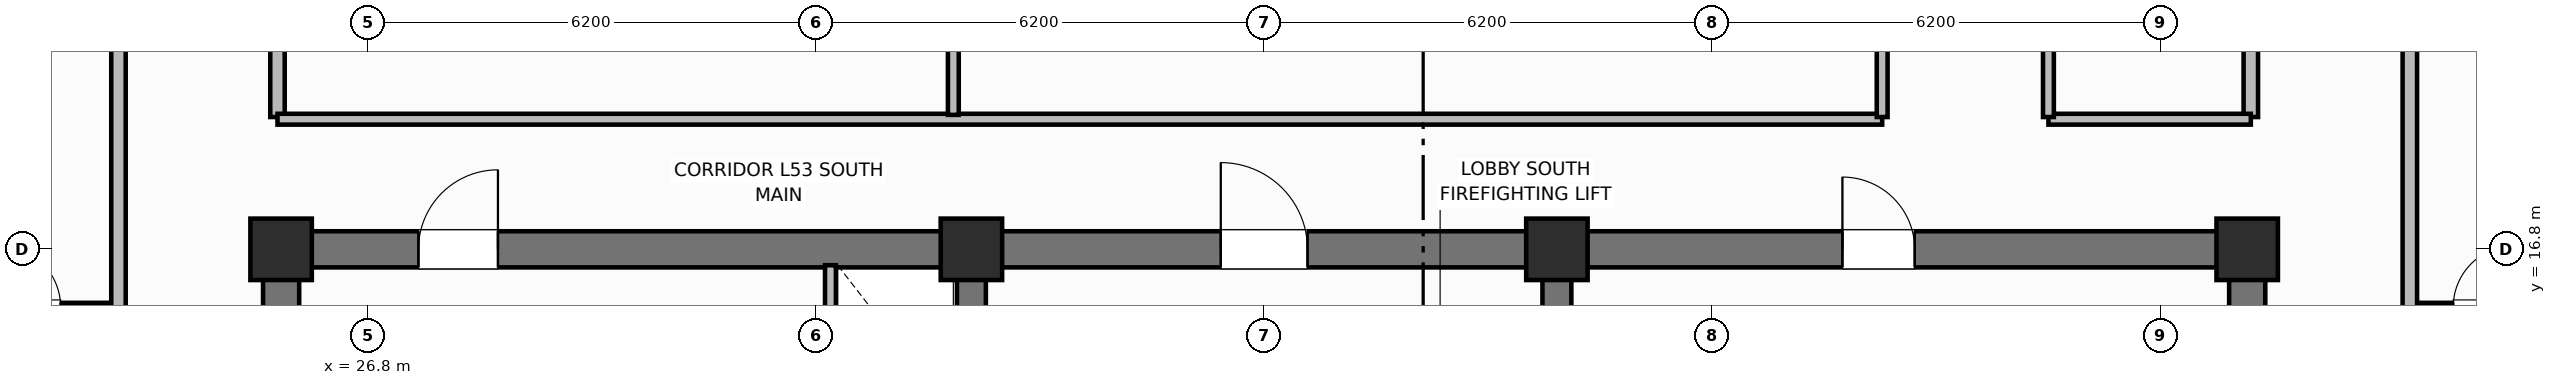
"""IFC4 building model, lengths in metres.
Left out: names, types, materials, properties, quantities, classifications, styles, units other than length and angle.
Written with IfcOpenShell. Run it as: python <this file> out.ifc"""

import sys

from ifc_helpers import new_model, si_unit, direction, frame, frame_2d, origin, origin_2d, place, context, subcontext, project, spatial, rectangle, extrude, element, fill, save


model = new_model("IFC4")
c1 = context("Model", 3, precision=1e-05, world=origin(), true_north=direction((0.0, 1.0)))
c2 = subcontext(c1, "Body", "Model", "MODEL_VIEW")
j1 = project(units=[si_unit("LENGTHUNIT", "METRE"), si_unit("PLANEANGLEUNIT", "RADIAN")], contexts=[c1])
p1 = place(None, origin())
s1 = spatial("IfcSite", under=j1, at=p1, CompositionType="ELEMENT")
p2 = place(p1, origin())
s2 = spatial("IfcBuilding", under=s1, at=p2, CompositionType="ELEMENT")
p3 = place(p2, frame((0.0, 0.0, 214.7)))
s3 = spatial("IfcBuildingStorey", under=s2, at=p3, CompositionType="ELEMENT", Elevation=214.7)
for number, where, z_axis, x_axis in (
    (1, (25.6, 10.85, 0.0), (0.0, 0.0, 1.0), (0.0, 1.0, 0.0)),
    (2, (52.8, 10.85, 0.0), (0.0, 0.0, 1.0), (0.0, 1.0, 0.0)),
):
    element("IfcWall", number, at=place(p3, frame(where, z_axis=z_axis, x_axis=x_axis)), inside=s3, PredefinedType="SHEAR", context=c2, shape_type="SweptSolid", body=[
        extrude(rectangle(XDim=5.7, YDim=0.5, at=frame_2d((2.85, 0.0))), origin(), (0.0, 0.0, 1.0), 3.7),
    ])
p4 = place(p3, frame((25.6, 16.8, 0.0), z_axis=(0.0, 0.0, 1.0), x_axis=(1.0, 0.0, 0.0)))
e3 = element("IfcWall", 3, at=p4, inside=s3, PredefinedType="SHEAR", context=c2, shape_type="SweptSolid", body=[
    extrude(rectangle(XDim=27.2, YDim=0.5, at=frame_2d((13.6, 0.0))), origin(), (0.0, 0.0, 1.0), 3.7),
])
p5 = place(p4, frame((1.9, 0.0, 0.0)))
e4 = element("IfcOpeningElement", 4, at=p5, cuts=e3, PredefinedType="OPENING", context=c2, shape_type="SweptSolid", body=[
    extrude(rectangle(XDim=1.1, YDim=2.15, at=frame_2d((0.55, 1.075))), frame((0.0, 0.26, 0.0), z_axis=(0.0, -1.0, 0.0), x_axis=(1.0, 0.0, 0.0)), (0.0, 0.0, 1.0), 0.52),
])
p6 = place(p4, frame((13.0, 0.0, 0.0)))
e5 = element("IfcOpeningElement", 5, at=p6, cuts=e3, PredefinedType="OPENING", context=c2, shape_type="SweptSolid", body=[
    extrude(rectangle(XDim=1.2, YDim=2.15, at=frame_2d((0.6, 1.075))), frame((0.0, 0.26, 0.0), z_axis=(0.0, -1.0, 0.0), x_axis=(1.0, 0.0, 0.0)), (0.0, 0.0, 1.0), 0.52),
])
p7 = place(p4, frame((21.6, 0.0, 0.0)))
e6 = element("IfcOpeningElement", 6, at=p7, cuts=e3, PredefinedType="OPENING", context=c2, shape_type="SweptSolid", body=[
    extrude(rectangle(XDim=1.0, YDim=2.15, at=frame_2d((0.5, 1.075))), frame((0.0, 0.26, 0.0), z_axis=(0.0, -1.0, 0.0), x_axis=(1.0, 0.0, 0.0)), (0.0, 0.0, 1.0), 0.52),
])
for number, where, z_axis, x_axis in (
    (7, (35.15, 10.85, 0.0), (0.0, 0.0, 1.0), (0.0, 1.0, 0.0)),
    (8, (43.25, 10.85, 0.0), (0.0, 0.0, 1.0), (0.0, 1.0, 0.0)),
):
    element("IfcWall", number, at=place(p3, frame(where, z_axis=z_axis, x_axis=x_axis)), inside=s3, PredefinedType="SHEAR", context=c2, shape_type="SweptSolid", body=[
        extrude(rectangle(XDim=5.7, YDim=0.4, at=frame_2d((2.85, 0.0))), origin(), (0.0, 0.0, 1.0), 3.7),
    ])
for number, where, z_axis, x_axis in (
    (9, (25.6, 16.8, 0.0), (0.0, 0.0, 1.0), (1.0, 0.0, 0.0)),
    (10, (35.15, 16.8, 0.0), (0.0, 0.0, 1.0), (1.0, 0.0, 0.0)),
    (11, (43.25, 16.8, 0.0), (0.0, 0.0, 1.0), (1.0, 0.0, 0.0)),
    (12, (52.8, 16.8, 0.0), (0.0, 0.0, 1.0), (1.0, 0.0, 0.0)),
):
    element("IfcColumn", number, at=place(p3, frame(where, z_axis=z_axis, x_axis=x_axis)), inside=s3, PredefinedType="COLUMN", context=c2, shape_type="SweptSolid", body=[
        extrude(rectangle(XDim=0.85, YDim=0.85, at=origin_2d()), origin(), (0.0, 0.0, 1.0), 3.7),
    ])
p8 = place(p3, frame((33.2, 14.5, 0.0), z_axis=(0.0, 0.0, 1.0), x_axis=(0.0, 1.0, 0.0)))
e13 = element("IfcWall", 13, at=p8, inside=s3, PredefinedType="PARTITIONING", context=c2, shape_type="SweptSolid", body=[
    extrude(rectangle(XDim=2.08, YDim=0.15, at=frame_2d((1.04, 0.0))), origin(), (0.0, 0.0, 1.0), 2.55),
])
p9 = place(p8, frame((0.55, 0.0, 0.0)))
e14 = element("IfcOpeningElement", 14, at=p9, cuts=e13, PredefinedType="OPENING", context=c2, shape_type="SweptSolid", body=[
    extrude(rectangle(XDim=0.85, YDim=2.05, at=frame_2d((0.425, 1.025))), frame((0.0, 0.085, 0.0), z_axis=(0.0, -1.0, 0.0), x_axis=(1.0, 0.0, 0.0)), (0.0, 0.0, 1.0), 0.17),
])
for number, where, z_axis, x_axis in (
    (15, (25.55, 18.63, 0.0), (0.0, 0.0, 1.0), (0.0, 1.0, 0.0)),
    (16, (52.85, 18.63, 0.0), (0.0, 0.0, 1.0), (0.0, 1.0, 0.0)),
):
    element("IfcWall", number, at=place(p3, frame(where, z_axis=z_axis, x_axis=x_axis)), inside=s3, PredefinedType="PARTITIONING", context=c2, shape_type="SweptSolid", body=[
        extrude(rectangle(XDim=19.14, YDim=0.2, at=frame_2d((9.57, 0.0))), origin(), (0.0, 0.0, 1.0), 2.55),
    ])
p10 = place(p3, frame((25.55, 18.6, 0.0), z_axis=(0.0, 0.0, 1.0), x_axis=(1.0, 0.0, 0.0)))
e17 = element("IfcWall", 17, at=p10, inside=s3, PredefinedType="PARTITIONING", context=c2, shape_type="SweptSolid", body=[
    extrude(rectangle(XDim=22.2, YDim=0.15, at=frame_2d((11.1, 0.0))), origin(), (0.0, 0.0, 1.0), 2.55),
])
p11 = place(p3, frame((50.05, 18.6, 0.0), z_axis=(0.0, 0.0, 1.0), x_axis=(1.0, 0.0, 0.0)))
e18 = element("IfcWall", 18, at=p11, inside=s3, PredefinedType="PARTITIONING", context=c2, shape_type="SweptSolid", body=[
    extrude(rectangle(XDim=2.8, YDim=0.15, at=frame_2d((1.4, 0.0))), origin(), (0.0, 0.0, 1.0), 2.55),
])
p12 = place(p3, frame((34.9, 18.66, 0.0), z_axis=(0.0, 0.0, 1.0), x_axis=(0.0, 1.0, 0.0)))
e19 = element("IfcWall", 19, at=p12, inside=s3, PredefinedType="PARTITIONING", context=c2, shape_type="SweptSolid", body=[
    extrude(rectangle(XDim=19.08, YDim=0.15, at=frame_2d((9.54, 0.0))), origin(), (0.0, 0.0, 1.0), 2.55),
])
p13 = place(p12, frame((5.0, 0.0, 0.0)))
e20 = element("IfcOpeningElement", 20, at=p13, cuts=e19, PredefinedType="OPENING", context=c2, shape_type="SweptSolid", body=[
    extrude(rectangle(XDim=1.0, YDim=2.15, at=frame_2d((0.5, 1.075))), frame((0.0, 0.085, 0.0), z_axis=(0.0, -1.0, 0.0), x_axis=(1.0, 0.0, 0.0)), (0.0, 0.0, 1.0), 0.17),
])
p14 = place(p3, frame((47.75, 18.63, 0.0), z_axis=(0.0, 0.0, 1.0), x_axis=(0.0, 1.0, 0.0)))
e21 = element("IfcWall", 21, at=p14, inside=s3, PredefinedType="PARTITIONING", context=c2, shape_type="SweptSolid", body=[
    extrude(rectangle(XDim=19.14, YDim=0.15, at=frame_2d((9.57, 0.0))), origin(), (0.0, 0.0, 1.0), 2.55),
])
p15 = place(p14, frame((2.4, 0.0, 0.0)))
e22 = element("IfcOpeningElement", 22, at=p15, cuts=e21, PredefinedType="OPENING", context=c2, shape_type="SweptSolid", body=[
    extrude(rectangle(XDim=0.9, YDim=2.1, at=frame_2d((0.45, 1.05))), frame((0.0, 0.085, 0.0), z_axis=(0.0, -1.0, 0.0), x_axis=(1.0, 0.0, 0.0)), (0.0, 0.0, 1.0), 0.17),
])
p16 = place(p14, frame((9.847, 0.0, 0.0)))
e23 = element("IfcOpeningElement", 23, at=p16, cuts=e21, PredefinedType="OPENING", context=c2, shape_type="SweptSolid", body=[
    extrude(rectangle(XDim=0.9, YDim=2.1, at=frame_2d((0.45, 1.05))), frame((0.0, 0.085, 0.0), z_axis=(0.0, -1.0, 0.0), x_axis=(1.0, 0.0, 0.0)), (0.0, 0.0, 1.0), 0.17),
])
p17 = place(p3, frame((50.05, 18.63, 0.0), z_axis=(0.0, 0.0, 1.0), x_axis=(0.0, 1.0, 0.0)))
e24 = element("IfcWall", 24, at=p17, inside=s3, PredefinedType="PARTITIONING", context=c2, shape_type="SweptSolid", body=[
    extrude(rectangle(XDim=19.14, YDim=0.15, at=frame_2d((9.57, 0.0))), origin(), (0.0, 0.0, 1.0), 2.55),
])
p18 = place(p17, frame((2.2, 0.0, 0.0)))
e25 = element("IfcOpeningElement", 25, at=p18, cuts=e24, PredefinedType="OPENING", context=c2, shape_type="SweptSolid", body=[
    extrude(rectangle(XDim=1.0, YDim=2.15, at=frame_2d((0.5, 1.075))), frame((0.0, 0.085, 0.0), z_axis=(0.0, -1.0, 0.0), x_axis=(1.0, 0.0, 0.0)), (0.0, 0.0, 1.0), 0.17),
])
p19 = place(p17, frame((9.847, 0.0, 0.0)))
e26 = element("IfcOpeningElement", 26, at=p19, cuts=e24, PredefinedType="OPENING", context=c2, shape_type="SweptSolid", body=[
    extrude(rectangle(XDim=1.0, YDim=2.15, at=frame_2d((0.5, 1.075))), frame((0.0, 0.085, 0.0), z_axis=(0.0, -1.0, 0.0), x_axis=(1.0, 0.0, 0.0)), (0.0, 0.0, 1.0), 0.17),
])
p20 = place(p3, frame((21.1, 16.0, 0.0), z_axis=(0.0, 0.0, 1.0), x_axis=(1.0, 0.0, 0.0)))
e27 = element("IfcWall", 27, at=p20, inside=s3, PredefinedType="PARTITIONING", context=c2, shape_type="SweptSolid", body=[
    extrude(rectangle(XDim=2.25, YDim=0.12, at=frame_2d((1.125, 0.0))), origin(), (0.0, 0.0, 1.0), 2.55),
])
p21 = place(p20, frame((0.6, 0.0, 0.0)))
e28 = element("IfcOpeningElement", 28, at=p21, cuts=e27, PredefinedType="OPENING", context=c2, shape_type="SweptSolid", body=[
    extrude(rectangle(XDim=0.85, YDim=2.1, at=frame_2d((0.425, 1.05))), frame((0.0, 0.07, 0.0), z_axis=(0.0, -1.0, 0.0), x_axis=(1.0, 0.0, 0.0)), (0.0, 0.0, 1.0), 0.14),
])
p22 = place(p3, frame((23.35, 10.6, 0.0), z_axis=(0.0, 0.0, 1.0), x_axis=(0.0, 1.0, 0.0)))
e29 = element("IfcWall", 29, at=p22, inside=s3, PredefinedType="PARTITIONING", context=c2, shape_type="SweptSolid", body=[
    extrude(rectangle(XDim=35.2, YDim=0.2, at=frame_2d((17.6, 0.0))), origin(), (0.0, 0.0, 1.0), 2.55),
])
p23 = place(p22, frame((2.65, 0.0, 0.0)))
e30 = element("IfcOpeningElement", 30, at=p23, cuts=e29, PredefinedType="OPENING", context=c2, shape_type="SweptSolid", body=[
    extrude(rectangle(XDim=1.0, YDim=2.15, at=frame_2d((0.5, 1.075))), frame((0.0, 0.11, 0.0), z_axis=(0.0, -1.0, 0.0), x_axis=(1.0, 0.0, 0.0)), (0.0, 0.0, 1.0), 0.22),
])
p24 = place(p22, frame((19.79, 0.0, 0.0)))
e31 = element("IfcOpeningElement", 31, at=p24, cuts=e29, PredefinedType="OPENING", context=c2, shape_type="SweptSolid", body=[
    extrude(rectangle(XDim=1.0, YDim=2.15, at=frame_2d((0.5, 1.075))), frame((0.0, 0.11, 0.0), z_axis=(0.0, -1.0, 0.0), x_axis=(1.0, 0.0, 0.0)), (0.0, 0.0, 1.0), 0.22),
])
p25 = place(p3, frame((55.05, 16.0, 0.0), z_axis=(0.0, 0.0, 1.0), x_axis=(1.0, 0.0, 0.0)))
e32 = element("IfcWall", 32, at=p25, inside=s3, PredefinedType="PARTITIONING", context=c2, shape_type="SweptSolid", body=[
    extrude(rectangle(XDim=2.25, YDim=0.12, at=frame_2d((1.125, 0.0))), origin(), (0.0, 0.0, 1.0), 2.55),
])
p26 = place(p25, frame((0.6, 0.0, 0.0)))
e33 = element("IfcOpeningElement", 33, at=p26, cuts=e32, PredefinedType="OPENING", context=c2, shape_type="SweptSolid", body=[
    extrude(rectangle(XDim=0.85, YDim=2.1, at=frame_2d((0.425, 1.05))), frame((0.0, 0.07, 0.0), z_axis=(0.0, -1.0, 0.0), x_axis=(1.0, 0.0, 0.0)), (0.0, 0.0, 1.0), 0.14),
])
p27 = place(p3, frame((55.05, 10.6, 0.0), z_axis=(0.0, 0.0, 1.0), x_axis=(0.0, 1.0, 0.0)))
e34 = element("IfcWall", 34, at=p27, inside=s3, PredefinedType="PARTITIONING", context=c2, shape_type="SweptSolid", body=[
    extrude(rectangle(XDim=35.2, YDim=0.2, at=frame_2d((17.6, 0.0))), origin(), (0.0, 0.0, 1.0), 2.55),
])
p28 = place(p27, frame((2.65, 0.0, 0.0)))
e35 = element("IfcOpeningElement", 35, at=p28, cuts=e34, PredefinedType="OPENING", context=c2, shape_type="SweptSolid", body=[
    extrude(rectangle(XDim=1.0, YDim=2.15, at=frame_2d((0.5, 1.075))), frame((0.0, 0.11, 0.0), z_axis=(0.0, -1.0, 0.0), x_axis=(1.0, 0.0, 0.0)), (0.0, 0.0, 1.0), 0.22),
])
p29 = place(p27, frame((12.166, 0.0, 0.0)))
e36 = element("IfcOpeningElement", 36, at=p29, cuts=e34, PredefinedType="OPENING", context=c2, shape_type="SweptSolid", body=[
    extrude(rectangle(XDim=1.0, YDim=2.15, at=frame_2d((0.5, 1.075))), frame((0.0, 0.11, 0.0), z_axis=(0.0, -1.0, 0.0), x_axis=(1.0, 0.0, 0.0)), (0.0, 0.0, 1.0), 0.22),
])
p30 = place(p27, frame((23.65, 0.0, 0.0)))
e37 = element("IfcOpeningElement", 37, at=p30, cuts=e34, PredefinedType="OPENING", context=c2, shape_type="SweptSolid", body=[
    extrude(rectangle(XDim=1.0, YDim=2.15, at=frame_2d((0.5, 1.075))), frame((0.0, 0.11, 0.0), z_axis=(0.0, -1.0, 0.0), x_axis=(1.0, 0.0, 0.0)), (0.0, 0.0, 1.0), 0.22),
])
p31 = place(p21, origin())
e38 = element("IfcDoor", 38, at=p31, inside=s3, OperationType="SINGLE_SWING_LEFT", PredefinedType="DOOR", context=c2, shape_type="SweptSolid", body=[
    extrude(rectangle(XDim=0.85, YDim=2.1, at=frame_2d((0.425, 1.05))), frame((0.0, 0.025, 0.0), z_axis=(0.0, -1.0, 0.0), x_axis=(1.0, 0.0, 0.0)), (0.0, 0.0, 1.0), 0.05),
])
fill(e28, e38)
p32 = place(p26, origin())
e39 = element("IfcDoor", 39, at=p32, inside=s3, OperationType="SINGLE_SWING_RIGHT", PredefinedType="DOOR", context=c2, shape_type="SweptSolid", body=[
    extrude(rectangle(XDim=0.85, YDim=2.1, at=frame_2d((0.425, 1.05))), frame((0.0, 0.025, 0.0), z_axis=(0.0, -1.0, 0.0), x_axis=(1.0, 0.0, 0.0)), (0.0, 0.0, 1.0), 0.05),
])
fill(e33, e39)
p33 = place(p5, origin())
e40 = element("IfcDoor", 40, at=p33, inside=s3, OperationType="SINGLE_SWING_RIGHT", PredefinedType="DOOR", context=c2, shape_type="SweptSolid", body=[
    extrude(rectangle(XDim=1.1, YDim=2.15, at=frame_2d((0.55, 1.075))), frame((0.0, 0.025, 0.0), z_axis=(0.0, -1.0, 0.0), x_axis=(1.0, 0.0, 0.0)), (0.0, 0.0, 1.0), 0.05),
])
fill(e4, e40)
p34 = place(p6, origin())
e41 = element("IfcDoor", 41, at=p34, inside=s3, OperationType="SINGLE_SWING_LEFT", PredefinedType="DOOR", context=c2, shape_type="SweptSolid", body=[
    extrude(rectangle(XDim=1.2, YDim=2.15, at=frame_2d((0.6, 1.075))), frame((0.0, 0.025, 0.0), z_axis=(0.0, -1.0, 0.0), x_axis=(1.0, 0.0, 0.0)), (0.0, 0.0, 1.0), 0.05),
])
fill(e5, e41)
p35 = place(p7, origin())
e42 = element("IfcDoor", 42, at=p35, inside=s3, OperationType="SINGLE_SWING_LEFT", PredefinedType="DOOR", context=c2, shape_type="SweptSolid", body=[
    extrude(rectangle(XDim=1.0, YDim=2.15, at=frame_2d((0.5, 1.075))), frame((0.0, 0.025, 0.0), z_axis=(0.0, -1.0, 0.0), x_axis=(1.0, 0.0, 0.0)), (0.0, 0.0, 1.0), 0.05),
])
fill(e6, e42)
save(model, sys.argv[1])
